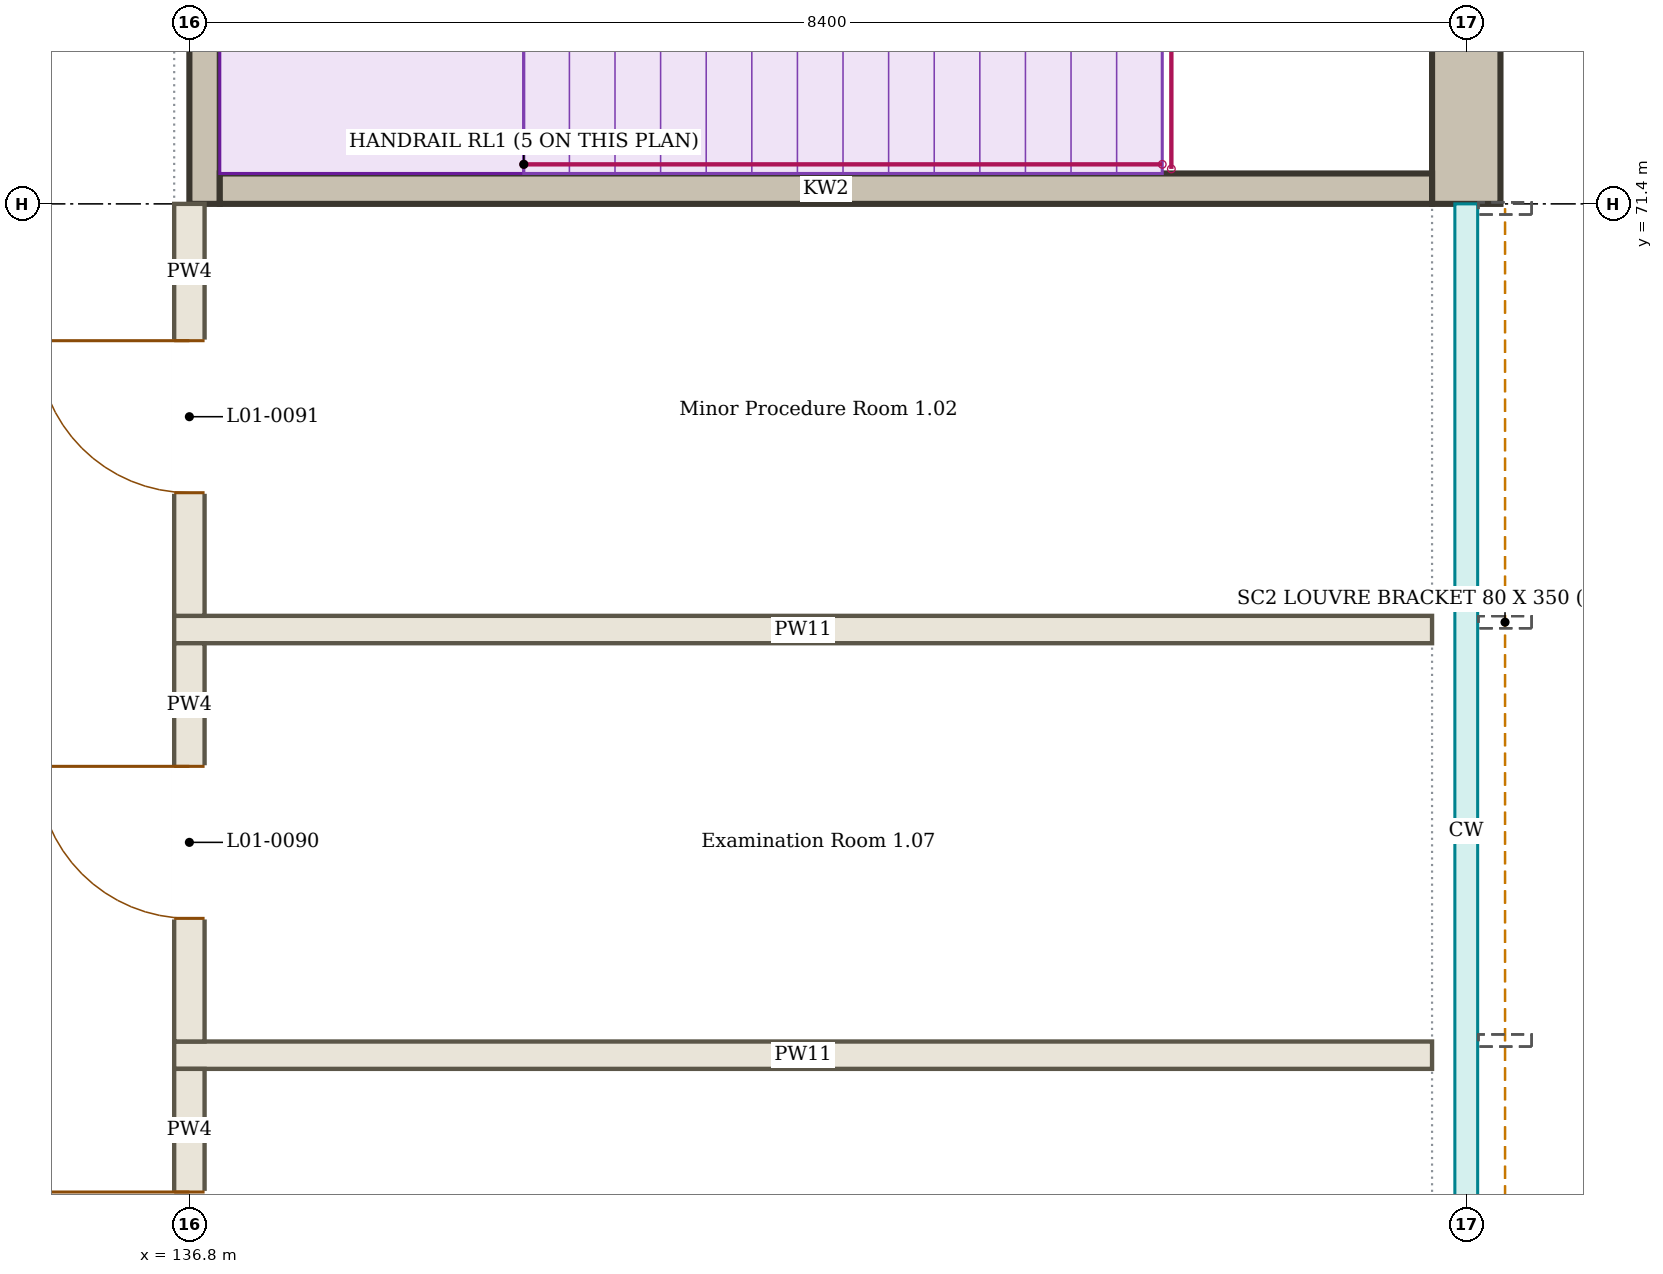
"""IFC4 building model, lengths in metres.
Left out: names, types, materials, properties, quantities, classifications, styles, units other than length and angle.
Written with IfcOpenShell. Run it as: python <this file> out.ifc"""

import sys

from ifc_helpers import new_model, si_unit, direction, frame, frame_2d, origin, place, context, subcontext, project, spatial, rectangle, extrude, element, fill, save


model = new_model("IFC4")
c1 = context("Model", 3, precision=1e-05, world=origin(), true_north=direction((0.0, 1.0)))
c2 = subcontext(c1, "Body", "Model", "MODEL_VIEW")
j1 = project(units=[si_unit("LENGTHUNIT", "METRE"), si_unit("PLANEANGLEUNIT", "RADIAN")], contexts=[c1])
p1 = place(None, origin())
s1 = spatial("IfcSite", under=j1, at=p1, CompositionType="ELEMENT")
p2 = place(p1, origin())
s2 = spatial("IfcBuilding", under=s1, at=p2, CompositionType="ELEMENT")
p3 = place(p2, frame((0.0, 0.0, 4.5)))
s3 = spatial("IfcBuildingStorey", under=s2, at=p3, CompositionType="ELEMENT", Elevation=4.5)
for number, where, z_axis, x_axis in (
    (1, (136.7, 65.8, 0.0), (0.0, 0.0, 1.0), (1.0, 0.0, 0.0)),
    (2, (136.7, 68.6, 0.0), (0.0, 0.0, 1.0), (1.0, 0.0, 0.0)),
):
    element("IfcWall", number, at=place(p3, frame(where, z_axis=z_axis, x_axis=x_axis)), inside=s3, PredefinedType="PARTITIONING", context=c2, shape_type="SweptSolid", body=[
        extrude(rectangle(XDim=8.275, YDim=0.18, at=frame_2d((4.138, 0.0))), origin(), (0.0, 0.0, 1.0), 3.9),
    ])
p4 = place(p3, frame((136.8, 63.15, 0.0), z_axis=(0.0, 0.0, 1.0), x_axis=(0.0, 1.0, 0.0)))
e3 = element("IfcWall", 3, at=p4, inside=s3, PredefinedType="PARTITIONING", context=c2, shape_type="SweptSolid", body=[
    extrude(rectangle(XDim=2.56, YDim=0.2, at=frame_2d((1.28, 0.0))), origin(), (0.0, 0.0, 1.0), 3.9),
])
p5 = place(p4, frame((0.75, 0.0, 0.0)))
e4 = element("IfcOpeningElement", 4, at=p5, cuts=e3, PredefinedType="OPENING", context=c2, shape_type="SweptSolid", body=[
    extrude(rectangle(XDim=1.0, YDim=2.1, at=frame_2d((0.5, 1.05))), frame((0.0, 0.11, 0.0), z_axis=(0.0, -1.0, 0.0), x_axis=(1.0, 0.0, 0.0)), (0.0, 0.0, 1.0), 0.22),
])
p6 = place(p3, frame((136.8, 65.89, 0.0), z_axis=(0.0, 0.0, 1.0), x_axis=(0.0, 1.0, 0.0)))
e5 = element("IfcWall", 5, at=p6, inside=s3, PredefinedType="PARTITIONING", context=c2, shape_type="SweptSolid", body=[
    extrude(rectangle(XDim=2.62, YDim=0.2, at=frame_2d((1.31, 0.0))), origin(), (0.0, 0.0, 1.0), 3.9),
])
p7 = place(p6, frame((0.81, 0.0, 0.0)))
e6 = element("IfcOpeningElement", 6, at=p7, cuts=e5, PredefinedType="OPENING", context=c2, shape_type="SweptSolid", body=[
    extrude(rectangle(XDim=1.0, YDim=2.1, at=frame_2d((0.5, 1.05))), frame((0.0, 0.11, 0.0), z_axis=(0.0, -1.0, 0.0), x_axis=(1.0, 0.0, 0.0)), (0.0, 0.0, 1.0), 0.22),
])
p8 = place(p3, frame((136.8, 68.69, 0.0), z_axis=(0.0, 0.0, 1.0), x_axis=(0.0, 1.0, 0.0)))
e7 = element("IfcWall", 7, at=p8, inside=s3, PredefinedType="PARTITIONING", context=c2, shape_type="SweptSolid", body=[
    extrude(rectangle(XDim=2.71, YDim=0.2, at=frame_2d((1.355, 0.0))), origin(), (0.0, 0.0, 1.0), 3.9),
])
p9 = place(p8, frame((0.81, 0.0, 0.0)))
e8 = element("IfcOpeningElement", 8, at=p9, cuts=e7, PredefinedType="OPENING", context=c2, shape_type="SweptSolid", body=[
    extrude(rectangle(XDim=1.0, YDim=2.1, at=frame_2d((0.5, 1.05))), frame((0.0, 0.11, 0.0), z_axis=(0.0, -1.0, 0.0), x_axis=(1.0, 0.0, 0.0)), (0.0, 0.0, 1.0), 0.22),
])
p10 = place(p3, frame((136.9, 71.4, 0.0), z_axis=(0.0, 0.0, 1.0), x_axis=(0.0, 1.0, 0.0)))
e9 = element("IfcWall", 9, at=p10, inside=s3, PredefinedType="SOLIDWALL", context=c2, shape_type="SweptSolid", body=[
    extrude(rectangle(XDim=8.4, YDim=0.2, at=frame_2d((4.2, 0.0))), origin(), (0.0, 0.0, 1.0), 4.5),
])
p11 = place(p10, frame((4.725, 0.0, 0.0)))
e10 = element("IfcOpeningElement", 10, at=p11, cuts=e9, PredefinedType="OPENING", context=c2, shape_type="SweptSolid", body=[
    extrude(rectangle(XDim=1.3, YDim=2.1, at=frame_2d((0.65, 1.05))), frame((0.0, 0.11, 0.0), z_axis=(0.0, -1.0, 0.0), x_axis=(1.0, 0.0, 0.0)), (0.0, 0.0, 1.0), 0.22),
])
p12 = place(p3, frame((145.2, 71.4, 0.0), z_axis=(0.0, 0.0, 1.0), x_axis=(0.0, 1.0, 0.0)))
e11 = element("IfcWall", 11, at=p12, inside=s3, PredefinedType="SOLIDWALL", context=c2, shape_type="SweptSolid", body=[
    extrude(rectangle(XDim=8.4, YDim=0.45, at=frame_2d((4.2, 0.0))), origin(), (0.0, 0.0, 1.0), 4.5),
])
p13 = place(p3, frame((137.0, 71.5, 0.0), z_axis=(0.0, 0.0, 1.0), x_axis=(1.0, 0.0, 0.0)))
e12 = element("IfcWall", 12, at=p13, inside=s3, PredefinedType="SOLIDWALL", context=c2, shape_type="SweptSolid", body=[
    extrude(rectangle(XDim=7.975, YDim=0.2, at=frame_2d((3.988, 0.0))), origin(), (0.0, 0.0, 1.0), 4.5),
])
p14 = place(p5, origin())
e13 = element("IfcDoor", 13, at=p14, inside=s3, OperationType="SINGLE_SWING_RIGHT", PredefinedType="DOOR", context=c2, shape_type="SweptSolid", body=[
    extrude(rectangle(XDim=1.0, YDim=2.1, at=frame_2d((0.5, 1.05))), frame((0.0, 0.025, 0.0), z_axis=(0.0, -1.0, 0.0), x_axis=(1.0, 0.0, 0.0)), (0.0, 0.0, 1.0), 0.05),
])
fill(e4, e13)
p15 = place(p7, origin())
e14 = element("IfcDoor", 14, at=p15, inside=s3, OperationType="SINGLE_SWING_RIGHT", PredefinedType="DOOR", context=c2, shape_type="SweptSolid", body=[
    extrude(rectangle(XDim=1.0, YDim=2.1, at=frame_2d((0.5, 1.05))), frame((0.0, 0.025, 0.0), z_axis=(0.0, -1.0, 0.0), x_axis=(1.0, 0.0, 0.0)), (0.0, 0.0, 1.0), 0.05),
])
fill(e6, e14)
p16 = place(p9, origin())
e15 = element("IfcDoor", 15, at=p16, inside=s3, OperationType="SINGLE_SWING_RIGHT", PredefinedType="DOOR", context=c2, shape_type="SweptSolid", body=[
    extrude(rectangle(XDim=1.0, YDim=2.1, at=frame_2d((0.5, 1.05))), frame((0.0, 0.025, 0.0), z_axis=(0.0, -1.0, 0.0), x_axis=(1.0, 0.0, 0.0)), (0.0, 0.0, 1.0), 0.05),
])
fill(e8, e15)
save(model, sys.argv[1])
